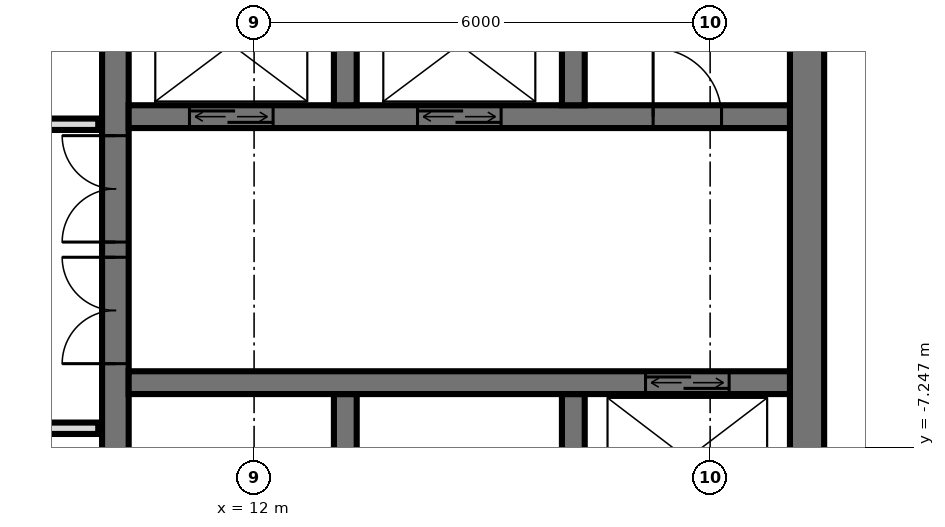
"""IFC4 building model, lengths in metres.
Left out: names, types, materials, properties, quantities, classifications, styles, units other than length and angle.
Written with IfcOpenShell. Run it as: python <this file> out.ifc"""

import sys

from ifc_helpers import new_model, si_unit, direction, frame, frame_2d, origin, place, context, subcontext, project, spatial, rectangle, extrude, element, fill, save


model = new_model("IFC4")
c1 = context("Model", 3, precision=1e-05, world=origin(), true_north=direction((0.0, 1.0)))
c2 = subcontext(c1, "Body", "Model", "MODEL_VIEW")
j1 = project(units=[si_unit("LENGTHUNIT", "METRE"), si_unit("PLANEANGLEUNIT", "RADIAN")], contexts=[c1])
p1 = place(None, origin())
s1 = spatial("IfcSite", under=j1, at=p1, CompositionType="ELEMENT")
p2 = place(p1, origin())
s2 = spatial("IfcBuilding", under=s1, at=p2, CompositionType="ELEMENT")
p3 = place(p2, frame((0.0, 0.0, 270.1)))
s3 = spatial("IfcBuildingStorey", under=s2, at=p3, CompositionType="ELEMENT", Elevation=270.1)
p4 = place(p3, frame((10.175, -14.55, 0.0), z_axis=(0.0, 0.0, 1.0), x_axis=(0.0, 1.0, 0.0)))
e1 = element("IfcWall", 1, at=p4, inside=s3, PredefinedType="SHEAR", context=c2, shape_type="SweptSolid", body=[
    extrude(rectangle(XDim=14.1, YDim=0.35, at=frame_2d((7.05, 0.0))), origin(), (0.0, 0.0, 1.0), 3.5),
])
p5 = place(p4, frame((8.4, 0.0, 0.0)))
e2 = element("IfcOpeningElement", 2, at=p5, cuts=e1, PredefinedType="OPENING", context=c2, shape_type="SweptSolid", body=[
    extrude(rectangle(XDim=1.4, YDim=2.4, at=frame_2d((0.7, 1.2))), frame((0.0, 0.185, 0.0), z_axis=(0.0, -1.0, 0.0), x_axis=(1.0, 0.0, 0.0)), (0.0, 0.0, 1.0), 0.37),
])
p6 = place(p4, frame((10.0, 0.0, 0.0)))
e3 = element("IfcOpeningElement", 3, at=p6, cuts=e1, PredefinedType="OPENING", context=c2, shape_type="SweptSolid", body=[
    extrude(rectangle(XDim=1.4, YDim=2.4, at=frame_2d((0.7, 1.2))), frame((0.0, 0.185, 0.0), z_axis=(0.0, -1.0, 0.0), x_axis=(1.0, 0.0, 0.0)), (0.0, 0.0, 1.0), 0.37),
])
p7 = place(p4, frame((4.0, 0.0, 0.0)))
e4 = element("IfcOpeningElement", 4, at=p7, cuts=e1, PredefinedType="OPENING", context=c2, shape_type="SweptSolid", body=[
    extrude(rectangle(XDim=1.2, YDim=2.1, at=frame_2d((0.6, 1.05))), frame((0.0, 0.185, 0.0), z_axis=(0.0, -1.0, 0.0), x_axis=(1.0, 0.0, 0.0)), (0.0, 0.0, 1.0), 0.37),
])
p8 = place(p3, frame((19.275, -14.55, 0.0), z_axis=(0.0, 0.0, 1.0), x_axis=(0.0, 1.0, 0.0)))
e5 = element("IfcWall", 5, at=p8, inside=s3, PredefinedType="SHEAR", context=c2, shape_type="SweptSolid", body=[
    extrude(rectangle(XDim=14.1, YDim=0.45, at=frame_2d((7.05, 0.0))), origin(), (0.0, 0.0, 1.0), 3.5),
])
p9 = place(p3, frame((10.35, -2.9, 0.0), z_axis=(0.0, 0.0, 1.0), x_axis=(1.0, 0.0, 0.0)))
e6 = element("IfcWall", 6, at=p9, inside=s3, PredefinedType="SHEAR", context=c2, shape_type="SweptSolid", body=[
    extrude(rectangle(XDim=8.7, YDim=0.3, at=frame_2d((4.35, 0.0))), origin(), (0.0, 0.0, 1.0), 3.5),
])
p10 = place(p9, frame((0.8, 0.0, 0.0)))
e7 = element("IfcOpeningElement", 7, at=p10, cuts=e6, PredefinedType="OPENING", context=c2, shape_type="SweptSolid", body=[
    extrude(rectangle(XDim=1.1, YDim=2.1, at=frame_2d((0.55, 1.05))), frame((0.0, 0.16, 0.0), z_axis=(0.0, -1.0, 0.0), x_axis=(1.0, 0.0, 0.0)), (0.0, 0.0, 1.0), 0.32),
])
p11 = place(p9, frame((3.8, 0.0, 0.0)))
e8 = element("IfcOpeningElement", 8, at=p11, cuts=e6, PredefinedType="OPENING", context=c2, shape_type="SweptSolid", body=[
    extrude(rectangle(XDim=1.1, YDim=2.1, at=frame_2d((0.55, 1.05))), frame((0.0, 0.16, 0.0), z_axis=(0.0, -1.0, 0.0), x_axis=(1.0, 0.0, 0.0)), (0.0, 0.0, 1.0), 0.32),
])
p12 = place(p9, frame((6.9, 0.0, 0.0)))
e9 = element("IfcOpeningElement", 9, at=p12, cuts=e6, PredefinedType="OPENING", context=c2, shape_type="SweptSolid", body=[
    extrude(rectangle(XDim=0.9, YDim=2.1, at=frame_2d((0.45, 1.05))), frame((0.0, 0.16, 0.0), z_axis=(0.0, -1.0, 0.0), x_axis=(1.0, 0.0, 0.0)), (0.0, 0.0, 1.0), 0.32),
])
p13 = place(p3, frame((10.35, -6.4, 0.0), z_axis=(0.0, 0.0, 1.0), x_axis=(1.0, 0.0, 0.0)))
e10 = element("IfcWall", 10, at=p13, inside=s3, PredefinedType="SHEAR", context=c2, shape_type="SweptSolid", body=[
    extrude(rectangle(XDim=8.7, YDim=0.3, at=frame_2d((4.35, 0.0))), origin(), (0.0, 0.0, 1.0), 3.5),
])
p14 = place(p13, frame((6.8, 0.0, 0.0)))
e11 = element("IfcOpeningElement", 11, at=p14, cuts=e10, PredefinedType="OPENING", context=c2, shape_type="SweptSolid", body=[
    extrude(rectangle(XDim=1.1, YDim=2.1, at=frame_2d((0.55, 1.05))), frame((0.0, 0.16, 0.0), z_axis=(0.0, -1.0, 0.0), x_axis=(1.0, 0.0, 0.0)), (0.0, 0.0, 1.0), 0.32),
])
for number, where, z_axis, x_axis in (
    (12, (13.2, -2.75, 0.0), (0.0, 0.0, 1.0), (0.0, 1.0, 0.0)),
    (13, (13.2, -8.85, 0.0), (0.0, 0.0, 1.0), (0.0, 1.0, 0.0)),
    (14, (16.2, -2.75, 0.0), (0.0, 0.0, 1.0), (0.0, 1.0, 0.0)),
    (15, (16.2, -8.85, 0.0), (0.0, 0.0, 1.0), (0.0, 1.0, 0.0)),
):
    element("IfcWall", number, at=place(p3, frame(where, z_axis=z_axis, x_axis=x_axis)), inside=s3, PredefinedType="SHEAR", context=c2, shape_type="SweptSolid", body=[
        extrude(rectangle(XDim=2.3, YDim=0.3, at=frame_2d((1.15, 0.0))), origin(), (0.0, 0.0, 1.0), 3.5),
    ])
p15 = place(p3, frame((-9.95, -7.0, 0.0), z_axis=(0.0, 0.0, 1.0), x_axis=(1.0, 0.0, 0.0)))
e16 = element("IfcWall", 16, at=p15, inside=s3, PredefinedType="PARTITIONING", context=c2, shape_type="SweptSolid", body=[
    extrude(rectangle(XDim=19.9, YDim=0.15, at=frame_2d((9.95, 0.0))), origin(), (0.0, 0.0, 1.0), 3.22),
])
p16 = place(p15, frame((9.45, 0.0, 0.0)))
e17 = element("IfcOpeningElement", 17, at=p16, cuts=e16, PredefinedType="OPENING", context=c2, shape_type="SweptSolid", body=[
    extrude(rectangle(XDim=1.0, YDim=2.1, at=frame_2d((0.5, 1.05))), frame((0.0, 0.085, 0.0), z_axis=(0.0, -1.0, 0.0), x_axis=(1.0, 0.0, 0.0)), (0.0, 0.0, 1.0), 0.17),
])
p17 = place(p15, frame((15.45, 0.0, 0.0)))
e18 = element("IfcOpeningElement", 18, at=p17, cuts=e16, PredefinedType="OPENING", context=c2, shape_type="SweptSolid", body=[
    extrude(rectangle(XDim=1.0, YDim=2.1, at=frame_2d((0.5, 1.05))), frame((0.0, 0.085, 0.0), z_axis=(0.0, -1.0, 0.0), x_axis=(1.0, 0.0, 0.0)), (0.0, 0.0, 1.0), 0.17),
])
p18 = place(p3, frame((-9.95, -3.0, 0.0), z_axis=(0.0, 0.0, 1.0), x_axis=(1.0, 0.0, 0.0)))
e19 = element("IfcWall", 19, at=p18, inside=s3, PredefinedType="PARTITIONING", context=c2, shape_type="SweptSolid", body=[
    extrude(rectangle(XDim=19.9, YDim=0.15, at=frame_2d((9.95, 0.0))), origin(), (0.0, 0.0, 1.0), 3.22),
])
p19 = place(p18, frame((1.7, 0.0, 0.0)))
e20 = element("IfcOpeningElement", 20, at=p19, cuts=e19, PredefinedType="OPENING", context=c2, shape_type="SweptSolid", body=[
    extrude(rectangle(XDim=1.0, YDim=2.1, at=frame_2d((0.5, 1.05))), frame((0.0, 0.085, 0.0), z_axis=(0.0, -1.0, 0.0), x_axis=(1.0, 0.0, 0.0)), (0.0, 0.0, 1.0), 0.17),
])
p20 = place(p18, frame((5.45, 0.0, 0.0)))
e21 = element("IfcOpeningElement", 21, at=p20, cuts=e19, PredefinedType="OPENING", context=c2, shape_type="SweptSolid", body=[
    extrude(rectangle(XDim=1.0, YDim=2.1, at=frame_2d((0.5, 1.05))), frame((0.0, 0.085, 0.0), z_axis=(0.0, -1.0, 0.0), x_axis=(1.0, 0.0, 0.0)), (0.0, 0.0, 1.0), 0.17),
])
p21 = place(p18, frame((8.2, 0.0, 0.0)))
e22 = element("IfcOpeningElement", 22, at=p21, cuts=e19, PredefinedType="OPENING", context=c2, shape_type="SweptSolid", body=[
    extrude(rectangle(XDim=1.0, YDim=2.1, at=frame_2d((0.5, 1.05))), frame((0.0, 0.085, 0.0), z_axis=(0.0, -1.0, 0.0), x_axis=(1.0, 0.0, 0.0)), (0.0, 0.0, 1.0), 0.17),
])
p22 = place(p18, frame((11.95, 0.0, 0.0)))
e23 = element("IfcOpeningElement", 23, at=p22, cuts=e19, PredefinedType="OPENING", context=c2, shape_type="SweptSolid", body=[
    extrude(rectangle(XDim=1.0, YDim=2.1, at=frame_2d((0.5, 1.05))), frame((0.0, 0.085, 0.0), z_axis=(0.0, -1.0, 0.0), x_axis=(1.0, 0.0, 0.0)), (0.0, 0.0, 1.0), 0.17),
])
p23 = place(p18, frame((16.95, 0.0, 0.0)))
e24 = element("IfcOpeningElement", 24, at=p23, cuts=e19, PredefinedType="OPENING", context=c2, shape_type="SweptSolid", body=[
    extrude(rectangle(XDim=1.0, YDim=2.1, at=frame_2d((0.5, 1.05))), frame((0.0, 0.085, 0.0), z_axis=(0.0, -1.0, 0.0), x_axis=(1.0, 0.0, 0.0)), (0.0, 0.0, 1.0), 0.17),
])
p24 = place(p10, origin())
e25 = element("IfcDoor", 25, at=p24, inside=s3, OperationType="DOUBLE_DOOR_SLIDING", PredefinedType="USERDEFINED", context=c2, shape_type="SweptSolid", body=[
    extrude(rectangle(XDim=1.1, YDim=2.1, at=frame_2d((0.55, 1.05))), frame((0.0, 0.025, 0.0), z_axis=(0.0, -1.0, 0.0), x_axis=(1.0, 0.0, 0.0)), (0.0, 0.0, 1.0), 0.05),
])
fill(e7, e25)
p25 = place(p11, origin())
e26 = element("IfcDoor", 26, at=p25, inside=s3, OperationType="DOUBLE_DOOR_SLIDING", PredefinedType="USERDEFINED", context=c2, shape_type="SweptSolid", body=[
    extrude(rectangle(XDim=1.1, YDim=2.1, at=frame_2d((0.55, 1.05))), frame((0.0, 0.025, 0.0), z_axis=(0.0, -1.0, 0.0), x_axis=(1.0, 0.0, 0.0)), (0.0, 0.0, 1.0), 0.05),
])
fill(e8, e26)
p26 = place(p14, origin())
e27 = element("IfcDoor", 27, at=p26, inside=s3, OperationType="DOUBLE_DOOR_SLIDING", PredefinedType="USERDEFINED", context=c2, shape_type="SweptSolid", body=[
    extrude(rectangle(XDim=1.1, YDim=2.1, at=frame_2d((0.55, 1.05))), frame((0.0, 0.025, 0.0), z_axis=(0.0, -1.0, 0.0), x_axis=(1.0, 0.0, 0.0)), (0.0, 0.0, 1.0), 0.05),
])
fill(e11, e27)
p27 = place(p5, origin())
e28 = element("IfcDoor", 28, at=p27, inside=s3, OperationType="DOUBLE_DOOR_SINGLE_SWING", PredefinedType="DOOR", context=c2, shape_type="SweptSolid", body=[
    extrude(rectangle(XDim=1.4, YDim=2.4, at=frame_2d((0.7, 1.2))), frame((0.0, 0.025, 0.0), z_axis=(0.0, -1.0, 0.0), x_axis=(1.0, 0.0, 0.0)), (0.0, 0.0, 1.0), 0.05),
])
fill(e2, e28)
p28 = place(p6, origin())
e29 = element("IfcDoor", 29, at=p28, inside=s3, OperationType="DOUBLE_DOOR_SINGLE_SWING", PredefinedType="DOOR", context=c2, shape_type="SweptSolid", body=[
    extrude(rectangle(XDim=1.4, YDim=2.4, at=frame_2d((0.7, 1.2))), frame((0.0, 0.025, 0.0), z_axis=(0.0, -1.0, 0.0), x_axis=(1.0, 0.0, 0.0)), (0.0, 0.0, 1.0), 0.05),
])
fill(e3, e29)
p29 = place(p12, origin())
e30 = element("IfcDoor", 30, at=p29, inside=s3, OperationType="SINGLE_SWING_RIGHT", PredefinedType="DOOR", context=c2, shape_type="SweptSolid", body=[
    extrude(rectangle(XDim=0.9, YDim=2.1, at=frame_2d((0.45, 1.05))), frame((0.0, 0.025, 0.0), z_axis=(0.0, -1.0, 0.0), x_axis=(1.0, 0.0, 0.0)), (0.0, 0.0, 1.0), 0.05),
])
fill(e9, e30)
save(model, sys.argv[1])
